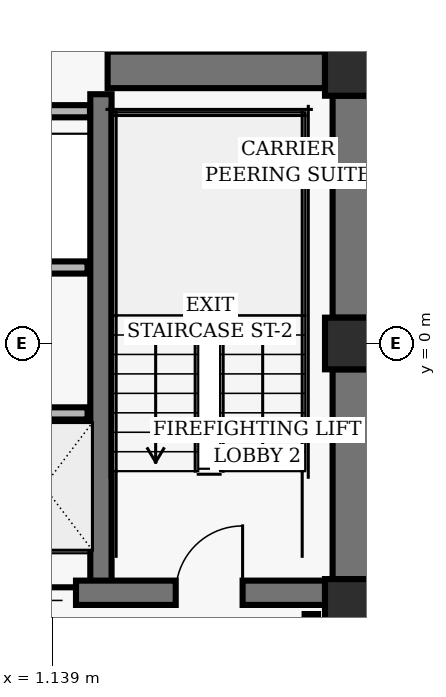
"""IFC4 building model, lengths in metres.
Left out: names, types, materials, properties, quantities, classifications, styles, units other than length and angle.
Written with IfcOpenShell. Run it as: python <this file> out.ifc"""

import sys

from ifc_helpers import new_model, si_unit, direction, frame, frame_2d, origin, origin_2d, place, context, subcontext, project, spatial, rectangle, hollow_rectangle, extrude, element, fill, save


model = new_model("IFC4")
c1 = context("Model", 3, precision=1e-05, world=origin(), true_north=direction((0.0, 1.0)))
c2 = subcontext(c1, "Body", "Model", "MODEL_VIEW")
j1 = project(units=[si_unit("LENGTHUNIT", "METRE"), si_unit("PLANEANGLEUNIT", "RADIAN")], contexts=[c1])
p1 = place(None, origin())
s1 = spatial("IfcSite", under=j1, at=p1, CompositionType="ELEMENT")
p2 = place(p1, origin())
s2 = spatial("IfcBuilding", under=s1, at=p2, CompositionType="ELEMENT")
p3 = place(p2, frame((0.0, 0.0, 116.8)))
s3 = spatial("IfcBuildingStorey", under=s2, at=p3, CompositionType="ELEMENT", Elevation=116.8)
for number, where, z_axis, x_axis in (
    (1, (6.05, 4.5, 0.0), (0.0, 0.0, 1.0), (1.0, 0.0, 0.0)),
    (2, (6.05, 0.0, 0.0), (0.0, 0.0, 1.0), (1.0, 0.0, 0.0)),
    (3, (6.05, -4.3, 0.0), (0.0, 0.0, 1.0), (1.0, 0.0, 0.0)),
):
    element("IfcColumn", number, at=place(p3, frame(where, z_axis=z_axis, x_axis=x_axis)), inside=s3, PredefinedType="COLUMN", context=c2, shape_type="SweptSolid", body=[
        extrude(hollow_rectangle(XDim=0.85, YDim=0.85, WallThickness=0.055, InnerFilletRadius=0.02, OuterFilletRadius=0.04, at=origin_2d()), origin(), (0.0, 0.0, 1.0), 3.04),
    ])
p4 = place(p3, frame((6.05, 0.425, 0.0), z_axis=(0.0, 0.0, 1.0), x_axis=(0.0, 1.0, 0.0)))
e4 = element("IfcWall", 4, at=p4, inside=s3, PredefinedType="SHEAR", context=c2, shape_type="SweptSolid", body=[
    extrude(rectangle(XDim=3.65, YDim=0.6, at=frame_2d((1.825, 0.0))), origin(), (0.0, 0.0, 1.0), 2.788),
])
p5 = place(p3, frame((6.05, -3.875, 0.0), z_axis=(0.0, 0.0, 1.0), x_axis=(0.0, 1.0, 0.0)))
e5 = element("IfcWall", 5, at=p5, inside=s3, PredefinedType="SHEAR", context=c2, shape_type="SweptSolid", body=[
    extrude(rectangle(XDim=3.45, YDim=0.6, at=frame_2d((1.725, 0.0))), origin(), (0.0, 0.0, 1.0), 2.788),
])
p6 = place(p3, frame((1.94, -4.1, 0.0), z_axis=(0.0, 0.0, 1.0), x_axis=(0.0, 1.0, 0.0)))
e6 = element("IfcWall", 6, at=p6, inside=s3, PredefinedType="SHEAR", context=c2, shape_type="SweptSolid", body=[
    extrude(rectangle(XDim=8.2, YDim=0.35, at=frame_2d((4.1, 0.0))), origin(), (0.0, 0.0, 1.0), 2.788),
])
p7 = place(p3, frame((-5.625, -4.1, 0.0), z_axis=(0.0, 0.0, 1.0), x_axis=(1.0, 0.0, 0.0)))
e7 = element("IfcWall", 7, at=p7, inside=s3, PredefinedType="SHEAR", context=c2, shape_type="SweptSolid", body=[
    extrude(rectangle(XDim=11.25, YDim=0.4, at=frame_2d((5.625, 0.0))), origin(), (0.0, 0.0, 1.0), 2.788),
])
p8 = place(p7, frame((1.355, 0.0, 0.0)))
e8 = element("IfcOpeningElement", 8, at=p8, cuts=e7, PredefinedType="OPENING", context=c2, shape_type="SweptSolid", body=[
    extrude(rectangle(XDim=1.1, YDim=2.04, at=frame_2d((0.55, 1.02))), frame((0.0, 0.21, 0.0), z_axis=(0.0, -1.0, 0.0), x_axis=(1.0, 0.0, 0.0)), (0.0, 0.0, 1.0), 0.42),
])
p9 = place(p7, frame((8.795, 0.0, 0.0)))
e9 = element("IfcOpeningElement", 9, at=p9, cuts=e7, PredefinedType="OPENING", context=c2, shape_type="SweptSolid", body=[
    extrude(rectangle(XDim=1.1, YDim=2.04, at=frame_2d((0.55, 1.02))), frame((0.0, 0.21, 0.0), z_axis=(0.0, -1.0, 0.0), x_axis=(1.0, 0.0, 0.0)), (0.0, 0.0, 1.0), 0.42),
])
p10 = place(p7, frame((4.095, 0.0, 0.0)))
e10 = element("IfcOpeningElement", 10, at=p10, cuts=e7, PredefinedType="OPENING", context=c2, shape_type="SweptSolid", body=[
    extrude(rectangle(XDim=1.06, YDim=2.04, at=frame_2d((0.53, 1.02))), frame((0.0, 0.21, 0.0), z_axis=(0.0, -1.0, 0.0), x_axis=(1.0, 0.0, 0.0)), (0.0, 0.0, 1.0), 0.42),
])
p11 = place(p7, frame((6.095, 0.0, 0.0)))
e11 = element("IfcOpeningElement", 11, at=p11, cuts=e7, PredefinedType="OPENING", context=c2, shape_type="SweptSolid", body=[
    extrude(rectangle(XDim=1.06, YDim=2.04, at=frame_2d((0.53, 1.02))), frame((0.0, 0.21, 0.0), z_axis=(0.0, -1.0, 0.0), x_axis=(1.0, 0.0, 0.0)), (0.0, 0.0, 1.0), 0.42),
])
p12 = place(p3, frame((2.05, 4.5, 0.0), z_axis=(0.0, 0.0, 1.0), x_axis=(1.0, 0.0, 0.0)))
e12 = element("IfcWall", 12, at=p12, inside=s3, PredefinedType="SHEAR", context=c2, shape_type="SweptSolid", body=[
    extrude(rectangle(XDim=3.575, YDim=0.6, at=frame_2d((1.788, 0.0))), origin(), (0.0, 0.0, 1.0), 2.788),
])
p13 = place(p3, frame((-1.72, -1.15, 0.0), z_axis=(0.0, 0.0, 1.0), x_axis=(1.0, 0.0, 0.0)))
e13 = element("IfcWall", 13, at=p13, inside=s3, PredefinedType="PARTITIONING", context=c2, shape_type="SweptSolid", body=[
    extrude(rectangle(XDim=3.44, YDim=0.2, at=frame_2d((1.72, 0.0))), origin(), (0.0, 0.0, 1.0), 2.763),
])
p14 = place(p3, frame((5.4, -7.16, 0.0), z_axis=(0.0, 0.0, 1.0), x_axis=(0.0, 1.0, 0.0)))
e14 = element("IfcWall", 14, at=p14, inside=s3, PredefinedType="PARTITIONING", context=c2, shape_type="SweptSolid", body=[
    extrude(rectangle(XDim=2.71, YDim=0.22, at=frame_2d((1.355, 0.0))), origin(), (0.0, 0.0, 1.0), 2.763),
])
p15 = place(p3, frame((-1.72, 1.25, 0.0), z_axis=(0.0, 0.0, 1.0), x_axis=(1.0, 0.0, 0.0)))
e15 = element("IfcWall", 15, at=p15, inside=s3, PredefinedType="PARTITIONING", context=c2, shape_type="SweptSolid", body=[
    extrude(rectangle(XDim=3.44, YDim=0.2, at=frame_2d((1.72, 0.0))), origin(), (0.0, 0.0, 1.0), 2.763),
])
p16 = place(p3, frame((-1.76, 3.82, 0.0), z_axis=(0.0, 0.0, 1.0), x_axis=(1.0, 0.0, 0.0)))
e16 = element("IfcWall", 16, at=p16, inside=s3, PredefinedType="PARTITIONING", context=c2, shape_type="SweptSolid", body=[
    extrude(rectangle(XDim=3.52, YDim=0.2, at=frame_2d((1.76, 0.0))), origin(), (0.0, 0.0, 1.0), 2.763),
])
p17 = place(p9, origin())
e17 = element("IfcDoor", 17, at=p17, inside=s3, OperationType="SINGLE_SWING_RIGHT", PredefinedType="DOOR", context=c2, shape_type="SweptSolid", body=[
    extrude(rectangle(XDim=1.1, YDim=2.04, at=frame_2d((0.55, 1.02))), frame((0.0, 0.025, 0.0), z_axis=(0.0, -1.0, 0.0), x_axis=(1.0, 0.0, 0.0)), (0.0, 0.0, 1.0), 0.05),
])
fill(e9, e17)
p18 = place(p11, origin())
e18 = element("IfcDoor", 18, at=p18, inside=s3, OperationType="SLIDING_TO_RIGHT", PredefinedType="DOOR", context=c2, shape_type="SweptSolid", body=[
    extrude(rectangle(XDim=1.06, YDim=2.04, at=frame_2d((0.53, 1.02))), frame((0.0, 0.025, 0.0), z_axis=(0.0, -1.0, 0.0), x_axis=(1.0, 0.0, 0.0)), (0.0, 0.0, 1.0), 0.05),
])
fill(e11, e18)
save(model, sys.argv[1])
